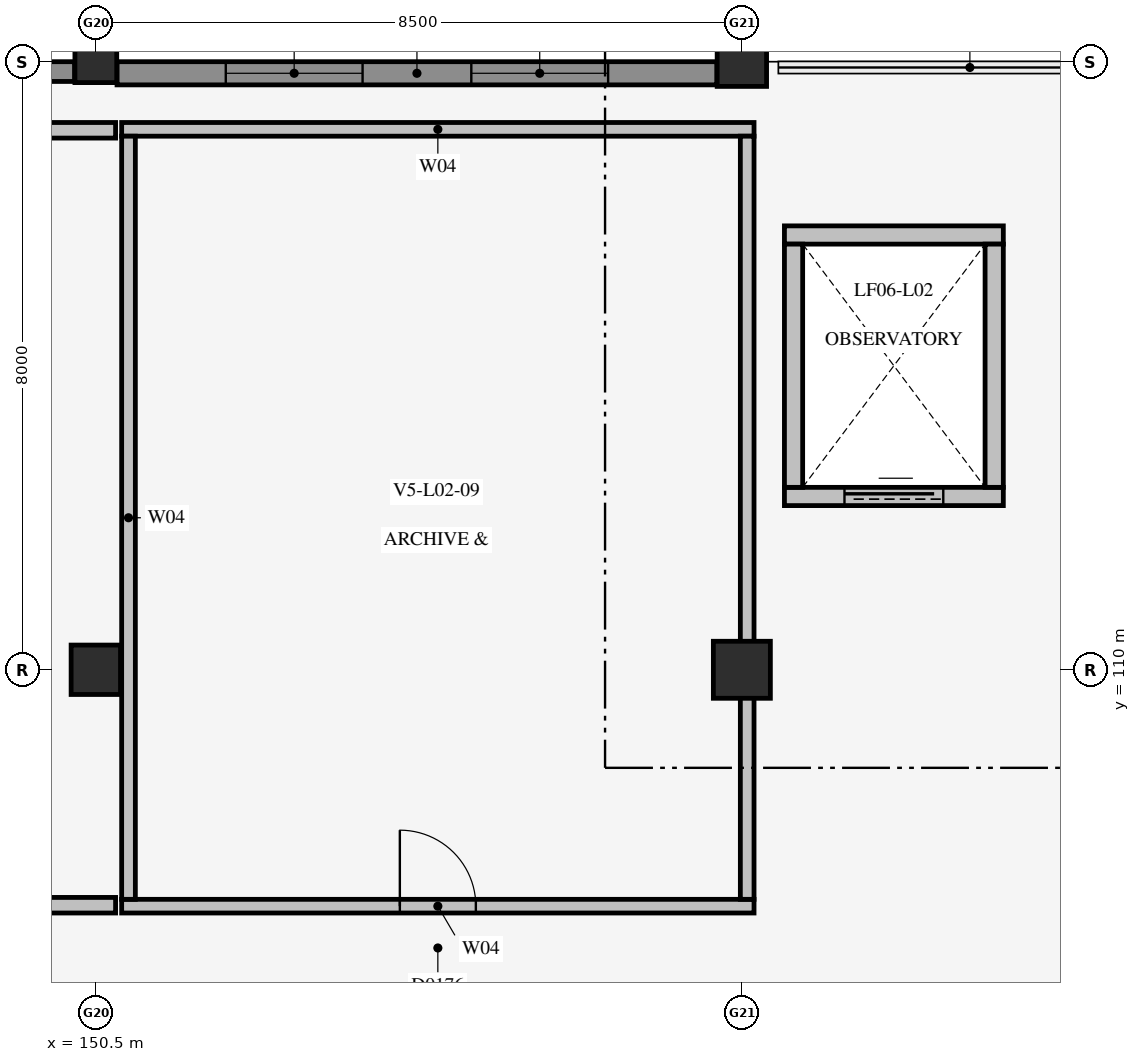
"""IFC4 building model, lengths in metres.
Left out: names, types, materials, properties, quantities, classifications, styles, units other than length and angle.
Written with IfcOpenShell. Run it as: python <this file> out.ifc"""

import sys

from ifc_helpers import new_model, si_unit, direction, frame, frame_2d, origin, origin_2d, place, context, subcontext, project, spatial, rectangle, extrude, element, fill, save


model = new_model("IFC4")
c1 = context("Model", 3, precision=1e-05, world=origin(), true_north=direction((0.0, 1.0)))
c2 = subcontext(c1, "Body", "Model", "MODEL_VIEW")
j1 = project(units=[si_unit("LENGTHUNIT", "METRE"), si_unit("PLANEANGLEUNIT", "RADIAN")], contexts=[c1])
p1 = place(None, origin())
s1 = spatial("IfcSite", under=j1, at=p1, CompositionType="ELEMENT")
p2 = place(p1, origin())
s2 = spatial("IfcBuilding", under=s1, at=p2, CompositionType="ELEMENT")
p3 = place(p2, frame((0.0, 0.0, 10.2)))
s3 = spatial("IfcBuildingStorey", under=s2, at=p3, CompositionType="ELEMENT", Elevation=10.2)
p4 = place(p3, frame((159.56, 112.28, 0.0), z_axis=(0.0, 0.0, 1.0), x_axis=(1.0, 0.0, 0.0)))
e1 = element("IfcWall", 1, at=p4, inside=s3, PredefinedType="SOLIDWALL", context=c2, shape_type="SweptSolid", body=[
    extrude(rectangle(XDim=2.88, YDim=0.24, at=frame_2d((1.44, 0.0))), origin(), (0.0, 0.0, 1.0), 4.6),
])
p5 = place(p4, frame((0.79, 0.0, 0.0)))
e2 = element("IfcOpeningElement", 2, at=p5, cuts=e1, PredefinedType="OPENING", context=c2, shape_type="SweptSolid", body=[
    extrude(rectangle(XDim=1.3, YDim=2.25, at=frame_2d((0.65, 1.125))), frame((0.0, 0.132, 0.0), z_axis=(0.0, -1.0, 0.0), x_axis=(1.0, 0.0, 0.0)), (0.0, 0.0, 1.0), 0.264),
])
p6 = place(p3, frame((159.56, 115.72, 0.0), z_axis=(0.0, 0.0, 1.0), x_axis=(1.0, 0.0, 0.0)))
e3 = element("IfcWall", 3, at=p6, inside=s3, PredefinedType="SOLIDWALL", context=c2, shape_type="SweptSolid", body=[
    extrude(rectangle(XDim=2.88, YDim=0.24, at=frame_2d((1.44, 0.0))), origin(), (0.0, 0.0, 1.0), 4.6),
])
for number, where, z_axis, x_axis in (
    (4, (159.68, 112.4, 0.0), (0.0, 0.0, 1.0), (0.0, 1.0, 0.0)),
    (5, (162.32, 112.4, 0.0), (0.0, 0.0, 1.0), (0.0, 1.0, 0.0)),
):
    element("IfcWall", number, at=place(p3, frame(where, z_axis=z_axis, x_axis=x_axis)), inside=s3, PredefinedType="SOLIDWALL", context=c2, shape_type="SweptSolid", body=[
        extrude(rectangle(XDim=3.2, YDim=0.24, at=frame_2d((1.6, 0.0))), origin(), (0.0, 0.0, 1.0), 4.6),
    ])
p7 = place(p3, frame((150.5, 110.0, 0.0), z_axis=(0.0, 0.0, 1.0), x_axis=(1.0, 0.0, 0.0)))
e6 = element("IfcColumn", 6, at=p7, inside=s3, PredefinedType="COLUMN", context=c2, shape_type="SweptSolid", body=[
    extrude(rectangle(XDim=0.65, YDim=0.65, at=origin_2d()), origin(), (0.0, 0.0, 1.0), 4.6),
])
p8 = place(p3, frame((150.5, 118.0, 0.0), z_axis=(0.0, 0.0, 1.0), x_axis=(1.0, 0.0, 0.0)))
e7 = element("IfcColumn", 7, at=p8, inside=s3, PredefinedType="COLUMN", context=c2, shape_type="SweptSolid", body=[
    extrude(rectangle(XDim=0.55, YDim=0.55, at=origin_2d()), origin(), (0.0, 0.0, 1.0), 4.6),
])
p9 = place(p3, frame((159.0, 110.0, 0.0), z_axis=(0.0, 0.0, 1.0), x_axis=(1.0, 0.0, 0.0)))
e8 = element("IfcColumn", 8, at=p9, inside=s3, PredefinedType="COLUMN", context=c2, shape_type="SweptSolid", body=[
    extrude(rectangle(XDim=0.75, YDim=0.75, at=origin_2d()), origin(), (0.0, 0.0, 1.0), 4.6),
])
p10 = place(p3, frame((159.0, 118.0, 0.0), z_axis=(0.0, 0.0, 1.0), x_axis=(1.0, 0.0, 0.0)))
e9 = element("IfcColumn", 9, at=p10, inside=s3, PredefinedType="COLUMN", context=c2, shape_type="SweptSolid", body=[
    extrude(rectangle(XDim=0.65, YDim=0.65, at=origin_2d()), origin(), (0.0, 0.0, 1.0), 4.6),
])
p11 = place(p3, frame((142.44, 106.903, 0.0), z_axis=(0.0, 0.0, 1.0), x_axis=(1.0, 0.0, 0.0)))
e10 = element("IfcWall", 10, at=p11, inside=s3, PredefinedType="SOLIDWALL", context=c2, shape_type="SweptSolid", body=[
    extrude(rectangle(XDim=8.32, YDim=0.205, at=frame_2d((4.16, 0.0))), origin(), (0.0, 0.0, 1.0), 4.365),
])
p12 = place(p11, frame((3.56, 0.0, 0.0)))
e11 = element("IfcOpeningElement", 11, at=p12, cuts=e10, PredefinedType="OPENING", context=c2, shape_type="SweptSolid", body=[
    extrude(rectangle(XDim=1.2, YDim=2.2, at=frame_2d((0.6, 1.1))), frame((0.0, 0.115, 0.0), z_axis=(0.0, -1.0, 0.0), x_axis=(1.0, 0.0, 0.0)), (0.0, 0.0, 1.0), 0.229),
])
p13 = place(p3, frame((142.44, 117.097, 0.0), z_axis=(0.0, 0.0, 1.0), x_axis=(1.0, 0.0, 0.0)))
e12 = element("IfcWall", 12, at=p13, inside=s3, PredefinedType="SOLIDWALL", context=c2, shape_type="SweptSolid", body=[
    extrude(rectangle(XDim=8.32, YDim=0.205, at=frame_2d((4.16, 0.0))), origin(), (0.0, 0.0, 1.0), 4.365),
])
p14 = place(p3, frame((150.84, 106.89, 0.0), z_axis=(0.0, 0.0, 1.0), x_axis=(1.0, 0.0, 0.0)))
e13 = element("IfcWall", 13, at=p14, inside=s3, PredefinedType="PARTITIONING", context=c2, shape_type="SweptSolid", body=[
    extrude(rectangle(XDim=8.32, YDim=0.18, at=frame_2d((4.16, 0.0))), origin(), (0.0, 0.0, 1.0), 4.365),
])
p15 = place(p14, frame((3.66, 0.0, 0.0)))
e14 = element("IfcOpeningElement", 14, at=p15, cuts=e13, PredefinedType="OPENING", context=c2, shape_type="SweptSolid", body=[
    extrude(rectangle(XDim=1.0, YDim=2.2, at=frame_2d((0.5, 1.1))), frame((0.0, 0.102, 0.0), z_axis=(0.0, -1.0, 0.0), x_axis=(1.0, 0.0, 0.0)), (0.0, 0.0, 1.0), 0.204),
])
p16 = place(p3, frame((150.84, 117.11, 0.0), z_axis=(0.0, 0.0, 1.0), x_axis=(1.0, 0.0, 0.0)))
e15 = element("IfcWall", 15, at=p16, inside=s3, PredefinedType="PARTITIONING", context=c2, shape_type="SweptSolid", body=[
    extrude(rectangle(XDim=8.32, YDim=0.18, at=frame_2d((4.16, 0.0))), origin(), (0.0, 0.0, 1.0), 4.365),
])
p17 = place(p3, frame((159.07, 106.98, 0.0), z_axis=(0.0, 0.0, 1.0), x_axis=(0.0, 1.0, 0.0)))
e16 = element("IfcWall", 16, at=p17, inside=s3, PredefinedType="PARTITIONING", context=c2, shape_type="SweptSolid", body=[
    extrude(rectangle(XDim=10.04, YDim=0.18, at=frame_2d((5.02, 0.0))), origin(), (0.0, 0.0, 1.0), 3.418),
])
p18 = place(p3, frame((150.93, 106.98, 0.0), z_axis=(0.0, 0.0, 1.0), x_axis=(0.0, 1.0, 0.0)))
e17 = element("IfcWall", 17, at=p18, inside=s3, PredefinedType="PARTITIONING", context=c2, shape_type="SweptSolid", body=[
    extrude(rectangle(XDim=10.04, YDim=0.18, at=frame_2d((5.02, 0.0))), origin(), (0.0, 0.0, 1.0), 4.365),
])
p19 = place(p3, frame((142.229, 117.87, 0.0), z_axis=(0.0, 0.0, 1.0), x_axis=(1.0, 0.0, 0.0)))
e18 = element("IfcWall", 18, at=p19, inside=s3, PredefinedType="SOLIDWALL", context=c2, shape_type="SweptSolid", body=[
    extrude(rectangle(XDim=7.992, YDim=0.26, at=frame_2d((3.996, 0.0))), origin(), (0.0, 0.0, 1.0), 3.814),
])
p20 = place(p19, frame((0.664, 0.0, 0.95)))
e19 = element("IfcOpeningElement", 19, at=p20, cuts=e18, PredefinedType="OPENING", context=c2, shape_type="SweptSolid", body=[
    extrude(rectangle(XDim=3.0, YDim=1.5, at=frame_2d((1.5, 0.75))), frame((0.0, 0.142, 0.0), z_axis=(0.0, -1.0, 0.0), x_axis=(1.0, 0.0, 0.0)), (0.0, 0.0, 1.0), 0.284),
])
p21 = place(p19, frame((4.328, 0.0, 0.95)))
e20 = element("IfcOpeningElement", 20, at=p21, cuts=e18, PredefinedType="OPENING", context=c2, shape_type="SweptSolid", body=[
    extrude(rectangle(XDim=3.0, YDim=1.5, at=frame_2d((1.5, 0.75))), frame((0.0, 0.142, 0.0), z_axis=(0.0, -1.0, 0.0), x_axis=(1.0, 0.0, 0.0)), (0.0, 0.0, 1.0), 0.284),
])
p22 = place(p3, frame((150.779, 117.847, 0.0), z_axis=(0.0, 0.0, 1.0), x_axis=(1.0, 0.0, 0.0)))
e21 = element("IfcWall", 21, at=p22, inside=s3, PredefinedType="SOLIDWALL", context=c2, shape_type="SweptSolid", body=[
    extrude(rectangle(XDim=7.892, YDim=0.305, at=frame_2d((3.946, 0.0))), origin(), (0.0, 0.0, 1.0), 3.738),
])
p23 = place(p22, frame((1.431, 0.0, 0.95)))
e22 = element("IfcOpeningElement", 22, at=p23, cuts=e21, PredefinedType="OPENING", context=c2, shape_type="SweptSolid", body=[
    extrude(rectangle(XDim=1.8, YDim=1.8, at=frame_2d((0.9, 0.9))), frame((0.0, 0.165, 0.0), z_axis=(0.0, -1.0, 0.0), x_axis=(1.0, 0.0, 0.0)), (0.0, 0.0, 1.0), 0.329),
])
p24 = place(p22, frame((4.661, 0.0, 0.95)))
e23 = element("IfcOpeningElement", 23, at=p24, cuts=e21, PredefinedType="OPENING", context=c2, shape_type="SweptSolid", body=[
    extrude(rectangle(XDim=1.8, YDim=1.8, at=frame_2d((0.9, 0.9))), frame((0.0, 0.165, 0.0), z_axis=(0.0, -1.0, 0.0), x_axis=(1.0, 0.0, 0.0)), (0.0, 0.0, 1.0), 0.329),
])
p25 = place(p15, origin())
e24 = element("IfcDoor", 24, at=p25, inside=s3, OperationType="SINGLE_SWING_LEFT", PredefinedType="DOOR", context=c2, shape_type="SweptSolid", body=[
    extrude(rectangle(XDim=1.0, YDim=2.2, at=frame_2d((0.5, 1.1))), frame((0.0, 0.025, 0.0), z_axis=(0.0, -1.0, 0.0), x_axis=(1.0, 0.0, 0.0)), (0.0, 0.0, 1.0), 0.05),
])
fill(e14, e24)
p26 = place(p23, origin())
e25 = element("IfcWindow", 25, at=p26, inside=s3, PartitioningType="SINGLE_PANEL", PredefinedType="WINDOW", context=c2, shape_type="SweptSolid", body=[
    extrude(rectangle(XDim=1.8, YDim=1.8, at=frame_2d((0.9, 0.9))), frame((0.0, 0.03, 0.0), z_axis=(0.0, -1.0, 0.0), x_axis=(1.0, 0.0, 0.0)), (0.0, 0.0, 1.0), 0.06),
])
fill(e22, e25)
p27 = place(p24, origin())
e26 = element("IfcWindow", 26, at=p27, inside=s3, PartitioningType="SINGLE_PANEL", PredefinedType="WINDOW", context=c2, shape_type="SweptSolid", body=[
    extrude(rectangle(XDim=1.8, YDim=1.8, at=frame_2d((0.9, 0.9))), frame((0.0, 0.03, 0.0), z_axis=(0.0, -1.0, 0.0), x_axis=(1.0, 0.0, 0.0)), (0.0, 0.0, 1.0), 0.06),
])
fill(e23, e26)
p28 = place(p5, origin())
e27 = element("IfcDoor", 27, at=p28, inside=s3, OperationType="SLIDING_TO_LEFT", PredefinedType="USERDEFINED", context=c2, shape_type="SweptSolid", body=[
    extrude(rectangle(XDim=1.3, YDim=2.25, at=frame_2d((0.65, 1.125))), frame((0.0, 0.025, 0.0), z_axis=(0.0, -1.0, 0.0), x_axis=(1.0, 0.0, 0.0)), (0.0, 0.0, 1.0), 0.05),
])
fill(e2, e27)
save(model, sys.argv[1])
